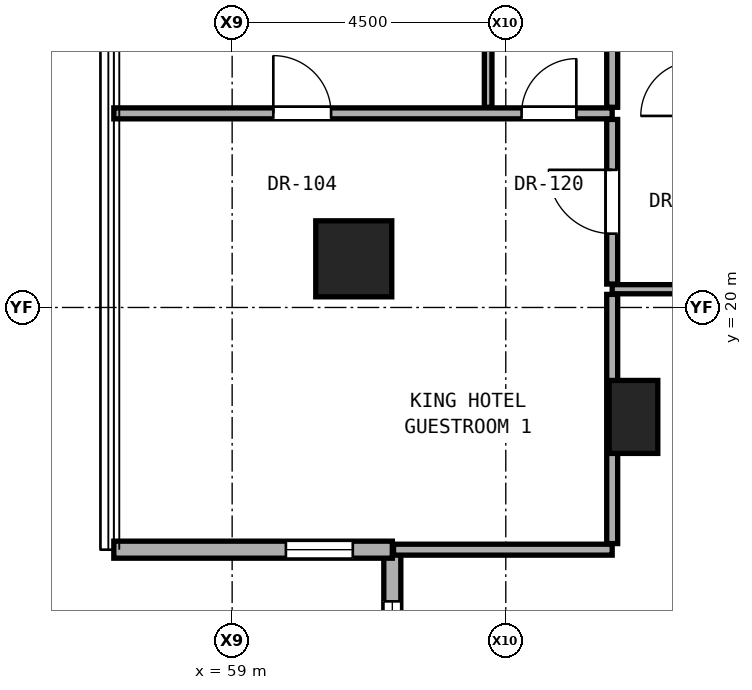
"""IFC4 building model, lengths in metres.
Left out: names, types, materials, properties, quantities, classifications, styles, units other than length and angle.
Written with IfcOpenShell. Run it as: python <this file> out.ifc"""

import sys

from ifc_helpers import new_model, si_unit, direction, frame, frame_2d, origin, origin_2d, place, context, subcontext, project, spatial, rectangle, hollow_rectangle, extrude, element, fill, save


model = new_model("IFC4")
c1 = context("Model", 3, precision=1e-05, world=origin(), true_north=direction((0.0, 1.0)))
c2 = subcontext(c1, "Body", "Model", "MODEL_VIEW")
j1 = project(units=[si_unit("LENGTHUNIT", "METRE"), si_unit("PLANEANGLEUNIT", "RADIAN")], contexts=[c1])
p1 = place(None, origin())
s1 = spatial("IfcSite", under=j1, at=p1, CompositionType="ELEMENT")
p2 = place(p1, origin())
s2 = spatial("IfcBuilding", under=s1, at=p2, CompositionType="ELEMENT")
p3 = place(p2, frame((0.0, 0.0, 45.5)))
s3 = spatial("IfcBuildingStorey", under=s2, at=p3, CompositionType="ELEMENT", Elevation=45.5)
p4 = place(p3, frame((61.0, 20.8, 0.0), z_axis=(0.0, 0.0, 1.0), x_axis=(1.0, 0.0, 0.0)))
e1 = element("IfcColumn", 1, at=p4, inside=s3, PredefinedType="COLUMN", context=c2, shape_type="SweptSolid", body=[
    extrude(hollow_rectangle(XDim=1.25, YDim=1.25, WallThickness=0.07, at=origin_2d()), origin(), (0.0, 0.0, 1.0), 3.3),
])
p5 = place(p3, frame((65.6, 18.2, 0.0), z_axis=(0.0, 0.0, 1.0), x_axis=(1.0, 0.0, 0.0)))
e2 = element("IfcColumn", 2, at=p5, inside=s3, PredefinedType="PILASTER", context=c2, shape_type="SweptSolid", body=[
    extrude(rectangle(XDim=0.8, YDim=1.2, at=origin_2d()), origin(), (0.0, 0.0, 1.0), 3.3),
])
p6 = place(p3, frame((61.634, 16.017, 0.0), z_axis=(0.0, 0.0, 1.0), x_axis=(0.0, -1.0, 0.0)))
e3 = element("IfcWall", 3, at=p6, inside=s3, PredefinedType="SOLIDWALL", context=c2, shape_type="SweptSolid", body=[
    extrude(rectangle(XDim=4.58, YDim=0.28, at=frame_2d((2.29, 0.0))), origin(), (0.0, 0.0, 1.0), 3.04),
])
p7 = place(p6, frame((0.85, 0.0, 0.79)))
e4 = element("IfcOpeningElement", 4, at=p7, cuts=e3, PredefinedType="OPENING", context=c2, shape_type="SweptSolid", body=[
    extrude(rectangle(XDim=1.8, YDim=2.1, at=frame_2d((0.9, 1.05))), frame((0.0, 0.15, 0.0), z_axis=(0.0, -1.0, 0.0), x_axis=(1.0, 0.0, 0.0)), (0.0, 0.0, 1.0), 0.3),
])
p8 = place(p3, frame((57.054, 16.017, 0.0), z_axis=(0.0, 0.0, 1.0), x_axis=(1.0, 0.0, 0.0)))
e5 = element("IfcWall", 5, at=p8, inside=s3, PredefinedType="SOLIDWALL", context=c2, shape_type="SweptSolid", body=[
    extrude(rectangle(XDim=4.58, YDim=0.28, at=frame_2d((2.29, 0.0))), origin(), (0.0, 0.0, 1.0), 3.04),
])
p9 = place(p8, frame((2.83, 0.0, 0.85)))
e6 = element("IfcOpeningElement", 6, at=p9, cuts=e5, PredefinedType="OPENING", context=c2, shape_type="SweptSolid", body=[
    extrude(rectangle(XDim=1.1, YDim=2.0, at=frame_2d((0.55, 1.0))), frame((0.0, 0.15, 0.0), z_axis=(0.0, -1.0, 0.0), x_axis=(1.0, 0.0, 0.0)), (0.0, 0.0, 1.0), 0.3),
])
p10 = place(p3, frame((61.654, 16.017, 0.0), z_axis=(0.0, 0.0, 1.0), x_axis=(1.0, 0.0, 0.0)))
e7 = element("IfcWall", 7, at=p10, inside=s3, PredefinedType="PARTITIONING", context=c2, shape_type="SweptSolid", body=[
    extrude(rectangle(XDim=3.596, YDim=0.18, at=frame_2d((1.798, 0.0))), origin(), (0.0, 0.0, 1.0), 3.06),
])
p11 = place(p3, frame((65.25, 20.3, 0.0), z_axis=(0.0, 0.0, 1.0), x_axis=(1.0, 0.0, 0.0)))
e8 = element("IfcWall", 8, at=p11, inside=s3, PredefinedType="PARTITIONING", context=c2, shape_type="SweptSolid", body=[
    extrude(rectangle(XDim=1.37, YDim=0.15, at=frame_2d((0.685, 0.0))), origin(), (0.0, 0.0, 1.0), 3.06),
])
p12 = place(p3, frame((57.054, 23.192, 0.0), z_axis=(0.0, 0.0, 1.0), x_axis=(1.0, 0.0, 0.0)))
e9 = element("IfcWall", 9, at=p12, inside=s3, PredefinedType="PARTITIONING", context=c2, shape_type="SweptSolid", body=[
    extrude(rectangle(XDim=8.196, YDim=0.18, at=frame_2d((4.098, 0.0))), origin(), (0.0, 0.0, 1.0), 2.196),
])
p13 = place(p12, frame((2.623, 0.0, 0.0)))
e10 = element("IfcOpeningElement", 10, at=p13, cuts=e9, PredefinedType="OPENING", context=c2, shape_type="SweptSolid", body=[
    extrude(rectangle(XDim=0.95, YDim=2.15, at=frame_2d((0.475, 1.075))), frame((0.0, 0.1, 0.0), z_axis=(0.0, -1.0, 0.0), x_axis=(1.0, 0.0, 0.0)), (0.0, 0.0, 1.0), 0.2),
])
p14 = place(p12, frame((6.706, 0.0, 0.0)))
e11 = element("IfcOpeningElement", 11, at=p14, cuts=e9, PredefinedType="OPENING", context=c2, shape_type="SweptSolid", body=[
    extrude(rectangle(XDim=0.9, YDim=2.1, at=frame_2d((0.45, 1.05))), frame((0.0, 0.1, 0.0), z_axis=(0.0, -1.0, 0.0), x_axis=(1.0, 0.0, 0.0)), (0.0, 0.0, 1.0), 0.2),
])
p15 = place(p3, frame((63.21, 23.292, 0.0), z_axis=(0.0, 0.0, 1.0), x_axis=(0.0, 1.0, 0.0)))
e12 = element("IfcWall", 12, at=p15, inside=s3, PredefinedType="PARTITIONING", context=c2, shape_type="SweptSolid", body=[
    extrude(rectangle(XDim=2.127, YDim=0.125, at=frame_2d((1.064, 0.0))), origin(), (0.0, 0.0, 1.0), 3.06),
])
p16 = place(p3, frame((65.25, 16.117, 0.0), z_axis=(0.0, 0.0, 1.0), x_axis=(0.0, 1.0, 0.0)))
e13 = element("IfcWall", 13, at=p16, inside=s3, PredefinedType="PARTITIONING", context=c2, shape_type="SweptSolid", body=[
    extrude(rectangle(XDim=4.098, YDim=0.18, at=frame_2d((2.049, 0.0))), origin(), (0.0, 0.0, 1.0), 2.436),
])
p17 = place(p3, frame((65.25, 20.385, 0.0), z_axis=(0.0, 0.0, 1.0), x_axis=(0.0, 1.0, 0.0)))
e14 = element("IfcWall", 14, at=p17, inside=s3, PredefinedType="PARTITIONING", context=c2, shape_type="SweptSolid", body=[
    extrude(rectangle(XDim=2.707, YDim=0.18, at=frame_2d((1.354, 0.0))), origin(), (0.0, 0.0, 1.0), 2.452),
])
p18 = place(p17, frame((0.829, 0.0, 0.0)))
e15 = element("IfcOpeningElement", 15, at=p18, cuts=e14, PredefinedType="OPENING", context=c2, shape_type="SweptSolid", body=[
    extrude(rectangle(XDim=1.05, YDim=2.2, at=frame_2d((0.525, 1.1))), frame((0.0, 0.1, 0.0), z_axis=(0.0, -1.0, 0.0), x_axis=(1.0, 0.0, 0.0)), (0.0, 0.0, 1.0), 0.2),
])
p19 = place(p3, frame((65.25, 23.292, 0.0), z_axis=(0.0, 0.0, 1.0), x_axis=(0.0, 1.0, 0.0)))
e16 = element("IfcWall", 16, at=p19, inside=s3, PredefinedType="PARTITIONING", context=c2, shape_type="SweptSolid", body=[
    extrude(rectangle(XDim=2.127, YDim=0.18, at=frame_2d((1.064, 0.0))), origin(), (0.0, 0.0, 1.0), 3.06),
])
p20 = place(p7, origin())
e17 = element("IfcWindow", 17, at=p20, inside=s3, PartitioningType="SINGLE_PANEL", PredefinedType="WINDOW", context=c2, shape_type="SweptSolid", body=[
    extrude(rectangle(XDim=1.8, YDim=2.1, at=frame_2d((0.9, 1.05))), frame((0.0, 0.03, 0.0), z_axis=(0.0, -1.0, 0.0), x_axis=(1.0, 0.0, 0.0)), (0.0, 0.0, 1.0), 0.06),
])
fill(e4, e17)
p21 = place(p9, origin())
e18 = element("IfcWindow", 18, at=p21, inside=s3, PartitioningType="SINGLE_PANEL", PredefinedType="WINDOW", context=c2, shape_type="SweptSolid", body=[
    extrude(rectangle(XDim=1.1, YDim=2.0, at=frame_2d((0.55, 1.0))), frame((0.0, 0.03, 0.0), z_axis=(0.0, -1.0, 0.0), x_axis=(1.0, 0.0, 0.0)), (0.0, 0.0, 1.0), 0.06),
])
fill(e6, e18)
p22 = place(p18, origin())
e19 = element("IfcDoor", 19, at=p22, inside=s3, OperationType="SINGLE_SWING_RIGHT", PredefinedType="DOOR", context=c2, shape_type="SweptSolid", body=[
    extrude(rectangle(XDim=1.05, YDim=2.2, at=frame_2d((0.525, 1.1))), frame((0.0, 0.025, 0.0), z_axis=(0.0, -1.0, 0.0), x_axis=(1.0, 0.0, 0.0)), (0.0, 0.0, 1.0), 0.05),
])
fill(e15, e19)
p23 = place(p13, origin())
e20 = element("IfcDoor", 20, at=p23, inside=s3, OperationType="SINGLE_SWING_LEFT", PredefinedType="DOOR", context=c2, shape_type="SweptSolid", body=[
    extrude(rectangle(XDim=0.95, YDim=2.15, at=frame_2d((0.475, 1.075))), frame((0.0, 0.025, 0.0), z_axis=(0.0, -1.0, 0.0), x_axis=(1.0, 0.0, 0.0)), (0.0, 0.0, 1.0), 0.05),
])
fill(e10, e20)
p24 = place(p14, origin())
e21 = element("IfcDoor", 21, at=p24, inside=s3, OperationType="SINGLE_SWING_RIGHT", PredefinedType="DOOR", context=c2, shape_type="SweptSolid", body=[
    extrude(rectangle(XDim=0.9, YDim=2.1, at=frame_2d((0.45, 1.05))), frame((0.0, 0.025, 0.0), z_axis=(0.0, -1.0, 0.0), x_axis=(1.0, 0.0, 0.0)), (0.0, 0.0, 1.0), 0.05),
])
fill(e11, e21)
save(model, sys.argv[1])
